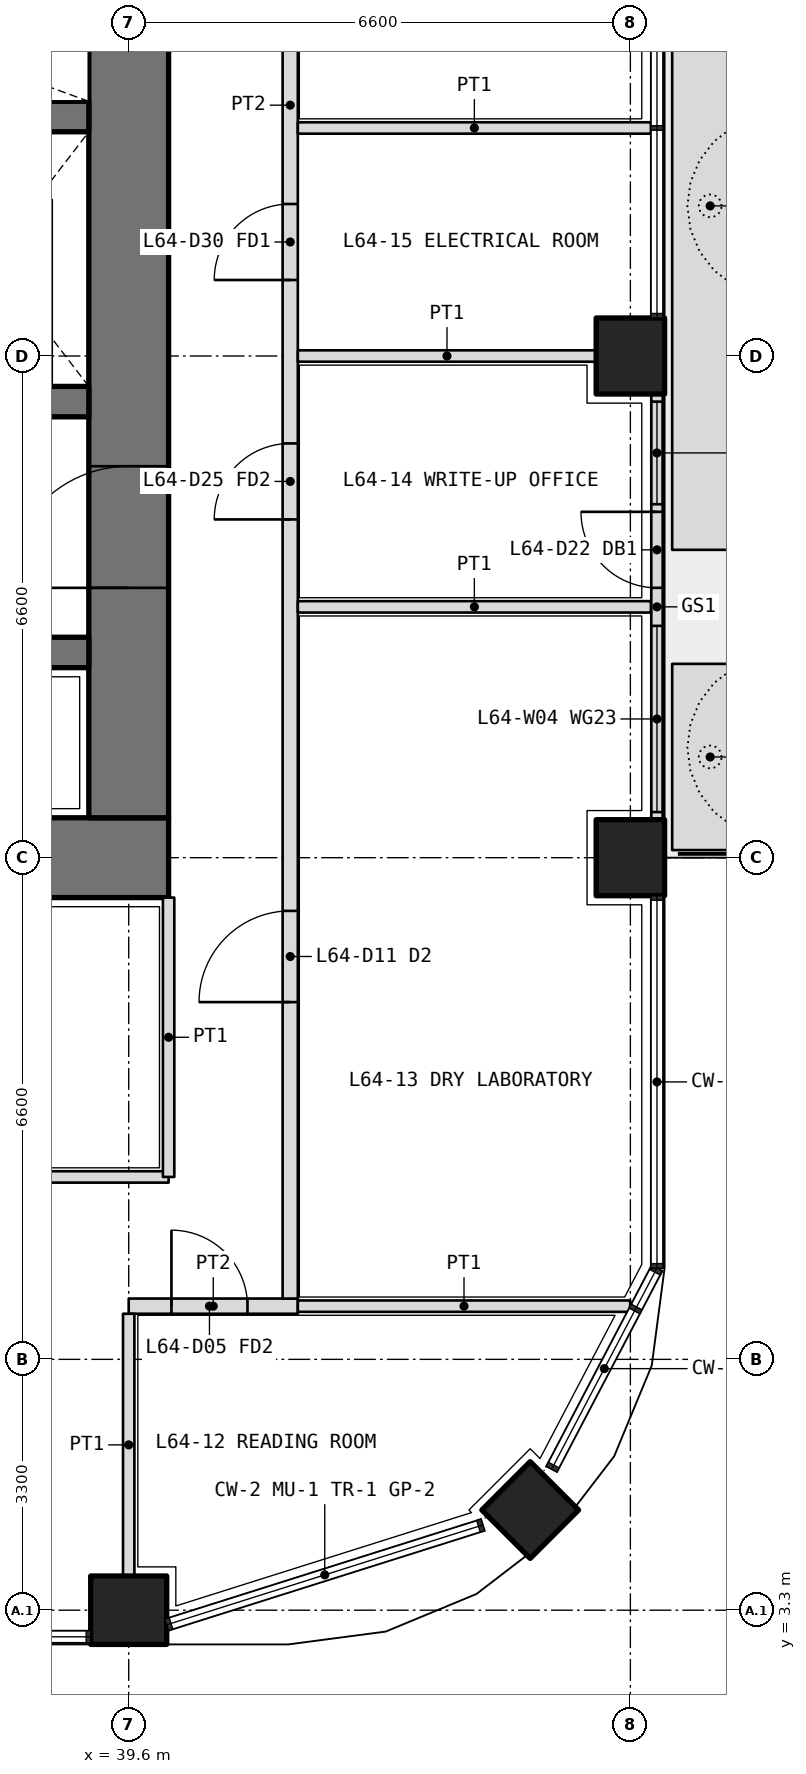
"""IFC4 building model, lengths in metres.
Left out: names, types, materials, properties, quantities, classifications, styles, units other than length and angle.
Written with IfcOpenShell. Run it as: python <this file> out.ifc"""

import sys

from ifc_helpers import new_model, si_unit, direction, frame, frame_2d, origin, origin_2d, place, context, subcontext, project, spatial, polyline, rectangle, outline, extrude, element, fill, save


model = new_model("IFC4")
c1 = context("Model", 3, precision=1e-05, world=origin(), true_north=direction((0.0, 1.0)))
c2 = subcontext(c1, "Body", "Model", "MODEL_VIEW")
j1 = project(units=[si_unit("LENGTHUNIT", "METRE"), si_unit("PLANEANGLEUNIT", "RADIAN")], contexts=[c1])
p1 = place(None, origin())
s1 = spatial("IfcSite", under=j1, at=p1, CompositionType="ELEMENT")
p2 = place(p1, origin())
s2 = spatial("IfcBuilding", under=s1, at=p2, CompositionType="ELEMENT")
p3 = place(p2, frame((0.0, 0.0, 279.6)))
s3 = spatial("IfcBuildingStorey", under=s2, at=p3, CompositionType="ELEMENT", Elevation=279.6)
p4 = place(p3, frame((44.882, 4.618, 0.0), z_axis=(0.0, 0.0, 1.0), x_axis=(0.707106781187, 0.707106781187, 0.0)))
e1 = element("IfcColumn", 1, at=p4, inside=s3, PredefinedType="COLUMN", context=c2, shape_type="SweptSolid", body=[
    extrude(rectangle(XDim=0.9, YDim=0.9, at=origin_2d()), origin(), (0.0, 0.0, 1.0), 4.2),
])
for number, where, z_axis, x_axis in (
    (2, (39.6, 3.3, 0.0), (0.0, 0.0, 1.0), (1.0, 0.0, 0.0)),
    (3, (46.2, 13.2, 0.0), (0.0, 0.0, 1.0), (0.0, 1.0, 0.0)),
    (4, (46.2, 19.8, 0.0), (0.0, 0.0, 1.0), (0.0, 1.0, 0.0)),
):
    element("IfcColumn", number, at=place(p3, frame(where, z_axis=z_axis, x_axis=x_axis)), inside=s3, PredefinedType="COLUMN", context=c2, shape_type="SweptSolid", body=[
        extrude(rectangle(XDim=1.0, YDim=0.9, at=origin_2d()), origin(), (0.0, 0.0, 1.0), 4.2),
    ])
p5 = place(p3, origin())
e5 = element("IfcWall", 5, at=p5, inside=s3, PredefinedType="USERDEFINED", context=c2, shape_type="SweptSolid", body=[
    extrude(outline(polyline([(46.75, 13.3), (47.75, 13.3), (47.75, 15.75), (46.75, 15.75), (46.75, 13.3)]), holes=[polyline([(46.9, 13.45), (47.6, 13.45), (47.6, 15.6), (46.9, 15.6), (46.9, 13.45)])]), origin(), (0.0, 0.0, 1.0), 1.05),
])
p6 = place(p3, origin())
e6 = element("IfcWall", 6, at=p6, inside=s3, PredefinedType="USERDEFINED", context=c2, shape_type="SweptSolid", body=[
    extrude(outline(polyline([(46.75, 17.25), (47.75, 17.25), (47.75, 26.3), (46.75, 26.3), (46.75, 17.25)]), holes=[polyline([(46.9, 17.4), (47.6, 17.4), (47.6, 26.15), (46.9, 26.15), (46.9, 17.4)])]), origin(), (0.0, 0.0, 1.0), 1.05),
])
p7 = place(p3, frame((46.55, 13.7, 0.0), z_axis=(0.0, 0.0, 1.0), x_axis=(0.0, 1.0, 0.0)))
e7 = element("IfcWall", 7, at=p7, inside=s3, PredefinedType="SOLIDWALL", context=c2, shape_type="SweptSolid", body=[
    extrude(rectangle(XDim=5.6, YDim=0.15, at=frame_2d((2.8, 0.0))), origin(), (0.0, 0.0, 1.0), 2.7),
])
p8 = place(p7, frame((3.05, 0.0, 0.0)))
e8 = element("IfcOpeningElement", 8, at=p8, cuts=e7, PredefinedType="OPENING", context=c2, shape_type="SweptSolid", body=[
    extrude(rectangle(XDim=1.0, YDim=2.4, at=frame_2d((0.5, 1.2))), frame((0.0, 0.085, 0.0), z_axis=(0.0, -1.0, 0.0), x_axis=(1.0, 0.0, 0.0)), (0.0, 0.0, 1.0), 0.17),
])
p9 = place(p7, frame((0.1, 0.0, 0.1)))
e9 = element("IfcOpeningElement", 9, at=p9, cuts=e7, PredefinedType="OPENING", context=c2, shape_type="SweptSolid", body=[
    extrude(rectangle(XDim=2.45, YDim=2.3, at=frame_2d((1.225, 1.15))), frame((0.0, 0.085, 0.0), z_axis=(0.0, -1.0, 0.0), x_axis=(1.0, 0.0, 0.0)), (0.0, 0.0, 1.0), 0.17),
])
p10 = place(p7, frame((4.15, 0.0, 0.1)))
e10 = element("IfcOpeningElement", 10, at=p10, cuts=e7, PredefinedType="OPENING", context=c2, shape_type="SweptSolid", body=[
    extrude(rectangle(XDim=1.35, YDim=2.3, at=frame_2d((0.675, 1.15))), frame((0.0, 0.085, 0.0), z_axis=(0.0, -1.0, 0.0), x_axis=(1.0, 0.0, 0.0)), (0.0, 0.0, 1.0), 0.17),
])
p11 = place(p3, frame((12.675, 13.2, 0.0), z_axis=(0.0, 0.0, 1.0), x_axis=(1.0, 0.0, 0.0)))
e11 = element("IfcWall", 11, at=p11, inside=s3, PredefinedType="SHEAR", context=c2, shape_type="SweptSolid", body=[
    extrude(rectangle(XDim=27.45, YDim=1.05, at=frame_2d((13.725, 0.0))), origin(), (0.0, 0.0, 1.0), 4.2),
])
p12 = place(p3, frame((39.6, 13.725, 0.0), z_axis=(0.0, 0.0, 1.0), x_axis=(0.0, 1.0, 0.0)))
e12 = element("IfcWall", 12, at=p12, inside=s3, PredefinedType="SHEAR", context=c2, shape_type="SweptSolid", body=[
    extrude(rectangle(XDim=18.75, YDim=1.05, at=frame_2d((9.375, 0.0))), origin(), (0.0, 0.0, 1.0), 4.2),
])
p13 = place(p12, frame((3.025, 0.0, 0.0)))
e13 = element("IfcOpeningElement", 13, at=p13, cuts=e12, PredefinedType="OPENING", context=c2, shape_type="SweptSolid", body=[
    extrude(rectangle(XDim=1.6, YDim=2.1, at=frame_2d((0.8, 1.05))), frame((0.0, 0.535, 0.0), z_axis=(0.0, -1.0, 0.0), x_axis=(1.0, 0.0, 0.0)), (0.0, 0.0, 1.0), 1.07),
])
p14 = place(p12, frame((13.825, 0.0, 0.0)))
e14 = element("IfcOpeningElement", 14, at=p14, cuts=e12, PredefinedType="OPENING", context=c2, shape_type="SweptSolid", body=[
    extrude(rectangle(XDim=1.6, YDim=2.1, at=frame_2d((0.8, 1.05))), frame((0.0, 0.535, 0.0), z_axis=(0.0, -1.0, 0.0), x_axis=(1.0, 0.0, 0.0)), (0.0, 0.0, 1.0), 1.07),
])
p15 = place(p3, frame((13.725, 15.9, 0.0), z_axis=(0.0, 0.0, 1.0), x_axis=(1.0, 0.0, 0.0)))
e15 = element("IfcWall", 15, at=p15, inside=s3, PredefinedType="SHEAR", context=c2, shape_type="SweptSolid", body=[
    extrude(rectangle(XDim=25.35, YDim=0.4, at=frame_2d((12.675, 0.0))), origin(), (0.0, 0.0, 1.0), 4.2),
])
p16 = place(p15, frame((0.837, 0.0, 0.0)))
e16 = element("IfcOpeningElement", 16, at=p16, cuts=e15, PredefinedType="OPENING", context=c2, shape_type="SweptSolid", body=[
    extrude(rectangle(XDim=1.0, YDim=2.1, at=frame_2d((0.5, 1.05))), frame((0.0, 0.21, 0.0), z_axis=(0.0, -1.0, 0.0), x_axis=(1.0, 0.0, 0.0)), (0.0, 0.0, 1.0), 0.42),
])
p17 = place(p15, frame((3.925, 0.0, 0.0)))
e17 = element("IfcOpeningElement", 17, at=p17, cuts=e15, PredefinedType="OPENING", context=c2, shape_type="SweptSolid", body=[
    extrude(rectangle(XDim=1.0, YDim=2.1, at=frame_2d((0.5, 1.05))), frame((0.0, 0.21, 0.0), z_axis=(0.0, -1.0, 0.0), x_axis=(1.0, 0.0, 0.0)), (0.0, 0.0, 1.0), 0.42),
])
p18 = place(p15, frame((7.225, 0.0, 0.0)))
e18 = element("IfcOpeningElement", 18, at=p18, cuts=e15, PredefinedType="OPENING", context=c2, shape_type="SweptSolid", body=[
    extrude(rectangle(XDim=1.0, YDim=2.1, at=frame_2d((0.5, 1.05))), frame((0.0, 0.21, 0.0), z_axis=(0.0, -1.0, 0.0), x_axis=(1.0, 0.0, 0.0)), (0.0, 0.0, 1.0), 0.42),
])
p19 = place(p15, frame((10.525, 0.0, 0.0)))
e19 = element("IfcOpeningElement", 19, at=p19, cuts=e15, PredefinedType="OPENING", context=c2, shape_type="SweptSolid", body=[
    extrude(rectangle(XDim=1.0, YDim=2.1, at=frame_2d((0.5, 1.05))), frame((0.0, 0.21, 0.0), z_axis=(0.0, -1.0, 0.0), x_axis=(1.0, 0.0, 0.0)), (0.0, 0.0, 1.0), 0.42),
])
p20 = place(p15, frame((13.825, 0.0, 0.0)))
e20 = element("IfcOpeningElement", 20, at=p20, cuts=e15, PredefinedType="OPENING", context=c2, shape_type="SweptSolid", body=[
    extrude(rectangle(XDim=1.0, YDim=2.1, at=frame_2d((0.5, 1.05))), frame((0.0, 0.21, 0.0), z_axis=(0.0, -1.0, 0.0), x_axis=(1.0, 0.0, 0.0)), (0.0, 0.0, 1.0), 0.42),
])
p21 = place(p15, frame((17.125, 0.0, 0.0)))
e21 = element("IfcOpeningElement", 21, at=p21, cuts=e15, PredefinedType="OPENING", context=c2, shape_type="SweptSolid", body=[
    extrude(rectangle(XDim=1.0, YDim=2.1, at=frame_2d((0.5, 1.05))), frame((0.0, 0.21, 0.0), z_axis=(0.0, -1.0, 0.0), x_axis=(1.0, 0.0, 0.0)), (0.0, 0.0, 1.0), 0.42),
])
p22 = place(p15, frame((20.425, 0.0, 0.0)))
e22 = element("IfcOpeningElement", 22, at=p22, cuts=e15, PredefinedType="OPENING", context=c2, shape_type="SweptSolid", body=[
    extrude(rectangle(XDim=1.0, YDim=2.1, at=frame_2d((0.5, 1.05))), frame((0.0, 0.21, 0.0), z_axis=(0.0, -1.0, 0.0), x_axis=(1.0, 0.0, 0.0)), (0.0, 0.0, 1.0), 0.42),
])
p23 = place(p15, frame((23.512, 0.0, 0.0)))
e23 = element("IfcOpeningElement", 23, at=p23, cuts=e15, PredefinedType="OPENING", context=c2, shape_type="SweptSolid", body=[
    extrude(rectangle(XDim=1.0, YDim=2.1, at=frame_2d((0.5, 1.05))), frame((0.0, 0.21, 0.0), z_axis=(0.0, -1.0, 0.0), x_axis=(1.0, 0.0, 0.0)), (0.0, 0.0, 1.0), 0.42),
])
p24 = place(p3, frame((13.725, 19.2, 0.0), z_axis=(0.0, 0.0, 1.0), x_axis=(1.0, 0.0, 0.0)))
e24 = element("IfcWall", 24, at=p24, inside=s3, PredefinedType="SHEAR", context=c2, shape_type="SweptSolid", body=[
    extrude(rectangle(XDim=25.35, YDim=0.4, at=frame_2d((12.675, 0.0))), origin(), (0.0, 0.0, 1.0), 4.2),
])
p25 = place(p24, frame((10.575, 0.0, 0.0)))
e25 = element("IfcOpeningElement", 25, at=p25, cuts=e24, PredefinedType="OPENING", context=c2, shape_type="SweptSolid", body=[
    extrude(rectangle(XDim=0.9, YDim=2.1, at=frame_2d((0.45, 1.05))), frame((0.0, 0.21, 0.0), z_axis=(0.0, -1.0, 0.0), x_axis=(1.0, 0.0, 0.0)), (0.0, 0.0, 1.0), 0.42),
])
p26 = place(p24, frame((13.875, 0.0, 0.0)))
e26 = element("IfcOpeningElement", 26, at=p26, cuts=e24, PredefinedType="OPENING", context=c2, shape_type="SweptSolid", body=[
    extrude(rectangle(XDim=0.9, YDim=2.1, at=frame_2d((0.45, 1.05))), frame((0.0, 0.21, 0.0), z_axis=(0.0, -1.0, 0.0), x_axis=(1.0, 0.0, 0.0)), (0.0, 0.0, 1.0), 0.42),
])
p27 = place(p24, frame((0.2, 0.0, 0.0)))
e27 = element("IfcOpeningElement", 27, at=p27, cuts=e24, PredefinedType="OPENING", context=c2, shape_type="SweptSolid", body=[
    extrude(rectangle(XDim=1.2, YDim=2.1, at=frame_2d((0.6, 1.05))), frame((0.0, 0.21, 0.0), z_axis=(0.0, -1.0, 0.0), x_axis=(1.0, 0.0, 0.0)), (0.0, 0.0, 1.0), 0.42),
])
p28 = place(p24, frame((23.512, 0.0, 0.0)))
e28 = element("IfcOpeningElement", 28, at=p28, cuts=e24, PredefinedType="OPENING", context=c2, shape_type="SweptSolid", body=[
    extrude(rectangle(XDim=1.1, YDim=2.1, at=frame_2d((0.55, 1.05))), frame((0.0, 0.21, 0.0), z_axis=(0.0, -1.0, 0.0), x_axis=(1.0, 0.0, 0.0)), (0.0, 0.0, 1.0), 0.42),
])
p29 = place(p24, frame((17.125, 0.0, 0.0)))
e29 = element("IfcOpeningElement", 29, at=p29, cuts=e24, PredefinedType="OPENING", context=c2, shape_type="SweptSolid", body=[
    extrude(rectangle(XDim=1.1, YDim=2.1, at=frame_2d((0.55, 1.05))), frame((0.0, 0.21, 0.0), z_axis=(0.0, -1.0, 0.0), x_axis=(1.0, 0.0, 0.0)), (0.0, 0.0, 1.0), 0.42),
])
p30 = place(p24, frame((20.325, 0.0, 0.0)))
e30 = element("IfcOpeningElement", 30, at=p30, cuts=e24, PredefinedType="OPENING", context=c2, shape_type="SweptSolid", body=[
    extrude(rectangle(XDim=1.1, YDim=2.1, at=frame_2d((0.55, 1.05))), frame((0.0, 0.21, 0.0), z_axis=(0.0, -1.0, 0.0), x_axis=(1.0, 0.0, 0.0)), (0.0, 0.0, 1.0), 0.42),
])
p31 = place(p3, frame((13.725, 22.95, 0.0), z_axis=(0.0, 0.0, 1.0), x_axis=(1.0, 0.0, 0.0)))
e31 = element("IfcWall", 31, at=p31, inside=s3, PredefinedType="SHEAR", context=c2, shape_type="SweptSolid", body=[
    extrude(rectangle(XDim=25.35, YDim=0.4, at=frame_2d((12.675, 0.0))), origin(), (0.0, 0.0, 1.0), 4.2),
])
p32 = place(p3, frame((12.675, 9.0, 0.0), z_axis=(0.0, 0.0, 1.0), x_axis=(1.0, 0.0, 0.0)))
e32 = element("IfcWall", 32, at=p32, inside=s3, PredefinedType="PARTITIONING", context=c2, shape_type="SweptSolid", body=[
    extrude(rectangle(XDim=27.45, YDim=0.15, at=frame_2d((13.725, 0.0))), origin(), (0.0, 0.0, 1.0), 3.0),
])
p33 = place(p32, frame((1.413, 0.0, 0.0)))
e33 = element("IfcOpeningElement", 33, at=p33, cuts=e32, PredefinedType="OPENING", context=c2, shape_type="SweptSolid", body=[
    extrude(rectangle(XDim=1.0, YDim=2.1, at=frame_2d((0.5, 1.05))), frame((0.0, 0.085, 0.0), z_axis=(0.0, -1.0, 0.0), x_axis=(1.0, 0.0, 0.0)), (0.0, 0.0, 1.0), 0.17),
])
p34 = place(p32, frame((8.275, 0.0, 0.0)))
e34 = element("IfcOpeningElement", 34, at=p34, cuts=e32, PredefinedType="OPENING", context=c2, shape_type="SweptSolid", body=[
    extrude(rectangle(XDim=1.0, YDim=2.1, at=frame_2d((0.5, 1.05))), frame((0.0, 0.085, 0.0), z_axis=(0.0, -1.0, 0.0), x_axis=(1.0, 0.0, 0.0)), (0.0, 0.0, 1.0), 0.17),
])
p35 = place(p32, frame((14.875, 0.0, 0.0)))
e35 = element("IfcOpeningElement", 35, at=p35, cuts=e32, PredefinedType="OPENING", context=c2, shape_type="SweptSolid", body=[
    extrude(rectangle(XDim=1.0, YDim=2.1, at=frame_2d((0.5, 1.05))), frame((0.0, 0.085, 0.0), z_axis=(0.0, -1.0, 0.0), x_axis=(1.0, 0.0, 0.0)), (0.0, 0.0, 1.0), 0.17),
])
p36 = place(p32, frame((21.738, 0.0, 0.0)))
e36 = element("IfcOpeningElement", 36, at=p36, cuts=e32, PredefinedType="OPENING", context=c2, shape_type="SweptSolid", body=[
    extrude(rectangle(XDim=1.0, YDim=2.1, at=frame_2d((0.5, 1.05))), frame((0.0, 0.085, 0.0), z_axis=(0.0, -1.0, 0.0), x_axis=(1.0, 0.0, 0.0)), (0.0, 0.0, 1.0), 0.17),
])
p37 = place(p3, frame((40.125, 12.675, 0.0), z_axis=(0.0, 0.0, 1.0), x_axis=(0.0, -1.0, 0.0)))
e37 = element("IfcWall", 37, at=p37, inside=s3, PredefinedType="PARTITIONING", context=c2, shape_type="SweptSolid", body=[
    extrude(rectangle(XDim=3.675, YDim=0.15, at=frame_2d((1.837, 0.0))), origin(), (0.0, 0.0, 1.0), 3.0),
])
p38 = place(p3, frame((39.6, 7.3, 0.0), z_axis=(0.0, 0.0, 1.0), x_axis=(1.0, 0.0, 0.0)))
e38 = element("IfcWall", 38, at=p38, inside=s3, PredefinedType="PARTITIONING", context=c2, shape_type="SweptSolid", body=[
    extrude(rectangle(XDim=2.225, YDim=0.2, at=frame_2d((1.112, 0.0))), origin(), (0.0, 0.0, 1.0), 3.0),
])
p39 = place(p38, frame((0.562, 0.0, 0.0)))
e39 = element("IfcOpeningElement", 39, at=p39, cuts=e38, PredefinedType="OPENING", context=c2, shape_type="SweptSolid", body=[
    extrude(rectangle(XDim=1.0, YDim=2.1, at=frame_2d((0.5, 1.05))), frame((0.0, 0.11, 0.0), z_axis=(0.0, -1.0, 0.0), x_axis=(1.0, 0.0, 0.0)), (0.0, 0.0, 1.0), 0.22),
])
p40 = place(p3, frame((41.725, 7.4, 0.0), z_axis=(0.0, 0.0, 1.0), x_axis=(0.0, 1.0, 0.0)))
e40 = element("IfcWall", 40, at=p40, inside=s3, PredefinedType="PARTITIONING", context=c2, shape_type="SweptSolid", body=[
    extrude(rectangle(XDim=31.4, YDim=0.2, at=frame_2d((15.7, 0.0))), origin(), (0.0, 0.0, 1.0), 3.0),
])
p41 = place(p40, frame((3.9, 0.0, 0.0)))
e41 = element("IfcOpeningElement", 41, at=p41, cuts=e40, PredefinedType="OPENING", context=c2, shape_type="SweptSolid", body=[
    extrude(rectangle(XDim=1.2, YDim=2.1, at=frame_2d((0.6, 1.05))), frame((0.0, 0.11, 0.0), z_axis=(0.0, -1.0, 0.0), x_axis=(1.0, 0.0, 0.0)), (0.0, 0.0, 1.0), 0.22),
])
p42 = place(p40, frame((10.25, 0.0, 0.0)))
e42 = element("IfcOpeningElement", 42, at=p42, cuts=e40, PredefinedType="OPENING", context=c2, shape_type="SweptSolid", body=[
    extrude(rectangle(XDim=1.0, YDim=2.1, at=frame_2d((0.5, 1.05))), frame((0.0, 0.11, 0.0), z_axis=(0.0, -1.0, 0.0), x_axis=(1.0, 0.0, 0.0)), (0.0, 0.0, 1.0), 0.22),
])
p43 = place(p40, frame((13.4, 0.0, 0.0)))
e43 = element("IfcOpeningElement", 43, at=p43, cuts=e40, PredefinedType="OPENING", context=c2, shape_type="SweptSolid", body=[
    extrude(rectangle(XDim=1.0, YDim=2.1, at=frame_2d((0.5, 1.05))), frame((0.0, 0.11, 0.0), z_axis=(0.0, -1.0, 0.0), x_axis=(1.0, 0.0, 0.0)), (0.0, 0.0, 1.0), 0.22),
])
p44 = place(p40, frame((16.75, 0.0, 0.0)))
e44 = element("IfcOpeningElement", 44, at=p44, cuts=e40, PredefinedType="OPENING", context=c2, shape_type="SweptSolid", body=[
    extrude(rectangle(XDim=0.9, YDim=2.1, at=frame_2d((0.45, 1.05))), frame((0.0, 0.11, 0.0), z_axis=(0.0, -1.0, 0.0), x_axis=(1.0, 0.0, 0.0)), (0.0, 0.0, 1.0), 0.22),
])
p45 = place(p40, frame((20.15, 0.0, 0.0)))
e45 = element("IfcOpeningElement", 45, at=p45, cuts=e40, PredefinedType="OPENING", context=c2, shape_type="SweptSolid", body=[
    extrude(rectangle(XDim=1.0, YDim=2.1, at=frame_2d((0.5, 1.05))), frame((0.0, 0.11, 0.0), z_axis=(0.0, -1.0, 0.0), x_axis=(1.0, 0.0, 0.0)), (0.0, 0.0, 1.0), 0.22),
])
p46 = place(p40, frame((23.45, 0.0, 0.0)))
e46 = element("IfcOpeningElement", 46, at=p46, cuts=e40, PredefinedType="OPENING", context=c2, shape_type="SweptSolid", body=[
    extrude(rectangle(XDim=1.0, YDim=2.1, at=frame_2d((0.5, 1.05))), frame((0.0, 0.11, 0.0), z_axis=(0.0, -1.0, 0.0), x_axis=(1.0, 0.0, 0.0)), (0.0, 0.0, 1.0), 0.22),
])
p47 = place(p40, frame((28.05, 0.0, 0.0)))
e47 = element("IfcOpeningElement", 47, at=p47, cuts=e40, PredefinedType="OPENING", context=c2, shape_type="SweptSolid", body=[
    extrude(rectangle(XDim=1.0, YDim=2.1, at=frame_2d((0.5, 1.05))), frame((0.0, 0.11, 0.0), z_axis=(0.0, -1.0, 0.0), x_axis=(1.0, 0.0, 0.0)), (0.0, 0.0, 1.0), 0.22),
])
p48 = place(p3, frame((46.198, 7.3, 0.0), z_axis=(0.0, 0.0, 1.0), x_axis=(-1.0, 0.0, 0.0)))
e48 = element("IfcWall", 48, at=p48, inside=s3, PredefinedType="PARTITIONING", context=c2, shape_type="SweptSolid", body=[
    extrude(rectangle(XDim=4.373, YDim=0.15, at=frame_2d((2.186, 0.0))), origin(), (0.0, 0.0, 1.0), 2.7),
])
p49 = place(p3, frame((39.6, 3.75, 0.0), z_axis=(0.0, 0.0, 1.0), x_axis=(0.0, 1.0, 0.0)))
e49 = element("IfcWall", 49, at=p49, inside=s3, PredefinedType="PARTITIONING", context=c2, shape_type="SweptSolid", body=[
    extrude(rectangle(XDim=3.45, YDim=0.15, at=frame_2d((1.725, 0.0))), origin(), (0.0, 0.0, 1.0), 3.0),
])
for number, where, z_axis, x_axis in (
    (50, (46.47, 22.8, 0.0), (0.0, 0.0, 1.0), (-1.0, 0.0, 0.0)),
    (51, (46.47, 16.5, 0.0), (0.0, 0.0, 1.0), (-1.0, 0.0, 0.0)),
):
    element("IfcWall", number, at=place(p3, frame(where, z_axis=z_axis, x_axis=x_axis)), inside=s3, PredefinedType="PARTITIONING", context=c2, shape_type="SweptSolid", body=[
        extrude(rectangle(XDim=4.645, YDim=0.15, at=frame_2d((2.323, 0.0))), origin(), (0.0, 0.0, 1.0), 2.7),
    ])
p50 = place(p3, frame((45.75, 19.8, 0.0), z_axis=(0.0, 0.0, 1.0), x_axis=(-1.0, 0.0, 0.0)))
e52 = element("IfcWall", 52, at=p50, inside=s3, PredefinedType="PARTITIONING", context=c2, shape_type="SweptSolid", body=[
    extrude(rectangle(XDim=3.925, YDim=0.15, at=frame_2d((1.962, 0.0))), origin(), (0.0, 0.0, 1.0), 3.0),
])
p51 = place(p8, origin())
e53 = element("IfcDoor", 53, at=p51, inside=s3, OperationType="SINGLE_SWING_RIGHT", PredefinedType="DOOR", context=c2, shape_type="SweptSolid", body=[
    extrude(rectangle(XDim=1.0, YDim=2.4, at=frame_2d((0.5, 1.2))), frame((0.0, 0.025, 0.0), z_axis=(0.0, -1.0, 0.0), x_axis=(1.0, 0.0, 0.0)), (0.0, 0.0, 1.0), 0.05),
])
fill(e8, e53)
p52 = place(p9, origin())
e54 = element("IfcWindow", 54, at=p52, inside=s3, PartitioningType="SINGLE_PANEL", PredefinedType="WINDOW", context=c2, shape_type="SweptSolid", body=[
    extrude(rectangle(XDim=2.45, YDim=2.3, at=frame_2d((1.225, 1.15))), frame((0.0, 0.03, 0.0), z_axis=(0.0, -1.0, 0.0), x_axis=(1.0, 0.0, 0.0)), (0.0, 0.0, 1.0), 0.06),
])
fill(e9, e54)
p53 = place(p10, origin())
e55 = element("IfcWindow", 55, at=p53, inside=s3, PartitioningType="SINGLE_PANEL", PredefinedType="WINDOW", context=c2, shape_type="SweptSolid", body=[
    extrude(rectangle(XDim=1.35, YDim=2.3, at=frame_2d((0.675, 1.15))), frame((0.0, 0.03, 0.0), z_axis=(0.0, -1.0, 0.0), x_axis=(1.0, 0.0, 0.0)), (0.0, 0.0, 1.0), 0.06),
])
fill(e10, e55)
p54 = place(p39, origin())
e56 = element("IfcDoor", 56, at=p54, inside=s3, OperationType="SINGLE_SWING_LEFT", PredefinedType="DOOR", context=c2, shape_type="SweptSolid", body=[
    extrude(rectangle(XDim=1.0, YDim=2.1, at=frame_2d((0.5, 1.05))), frame((0.0, 0.025, 0.0), z_axis=(0.0, -1.0, 0.0), x_axis=(1.0, 0.0, 0.0)), (0.0, 0.0, 1.0), 0.05),
])
fill(e39, e56)
p55 = place(p41, origin())
e57 = element("IfcDoor", 57, at=p55, inside=s3, OperationType="DOUBLE_DOOR_SINGLE_SWING", PredefinedType="DOOR", context=c2, shape_type="SweptSolid", body=[
    extrude(rectangle(XDim=1.2, YDim=2.1, at=frame_2d((0.6, 1.05))), frame((0.0, 0.025, 0.0), z_axis=(0.0, -1.0, 0.0), x_axis=(1.0, 0.0, 0.0)), (0.0, 0.0, 1.0), 0.05),
])
fill(e41, e57)
p56 = place(p42, origin())
e58 = element("IfcDoor", 58, at=p56, inside=s3, OperationType="SINGLE_SWING_LEFT", PredefinedType="DOOR", context=c2, shape_type="SweptSolid", body=[
    extrude(rectangle(XDim=1.0, YDim=2.1, at=frame_2d((0.5, 1.05))), frame((0.0, 0.025, 0.0), z_axis=(0.0, -1.0, 0.0), x_axis=(1.0, 0.0, 0.0)), (0.0, 0.0, 1.0), 0.05),
])
fill(e42, e58)
p57 = place(p43, origin())
e59 = element("IfcDoor", 59, at=p57, inside=s3, OperationType="SINGLE_SWING_LEFT", PredefinedType="DOOR", context=c2, shape_type="SweptSolid", body=[
    extrude(rectangle(XDim=1.0, YDim=2.1, at=frame_2d((0.5, 1.05))), frame((0.0, 0.025, 0.0), z_axis=(0.0, -1.0, 0.0), x_axis=(1.0, 0.0, 0.0)), (0.0, 0.0, 1.0), 0.05),
])
fill(e43, e59)
p58 = place(p13, origin())
e60 = element("IfcDoor", 60, at=p58, inside=s3, OperationType="DOUBLE_DOOR_DOUBLE_SWING", PredefinedType="DOOR", context=c2, shape_type="SweptSolid", body=[
    extrude(rectangle(XDim=1.6, YDim=2.1, at=frame_2d((0.8, 1.05))), frame((0.0, 0.025, 0.0), z_axis=(0.0, -1.0, 0.0), x_axis=(1.0, 0.0, 0.0)), (0.0, 0.0, 1.0), 0.05),
])
fill(e13, e60)
save(model, sys.argv[1])
